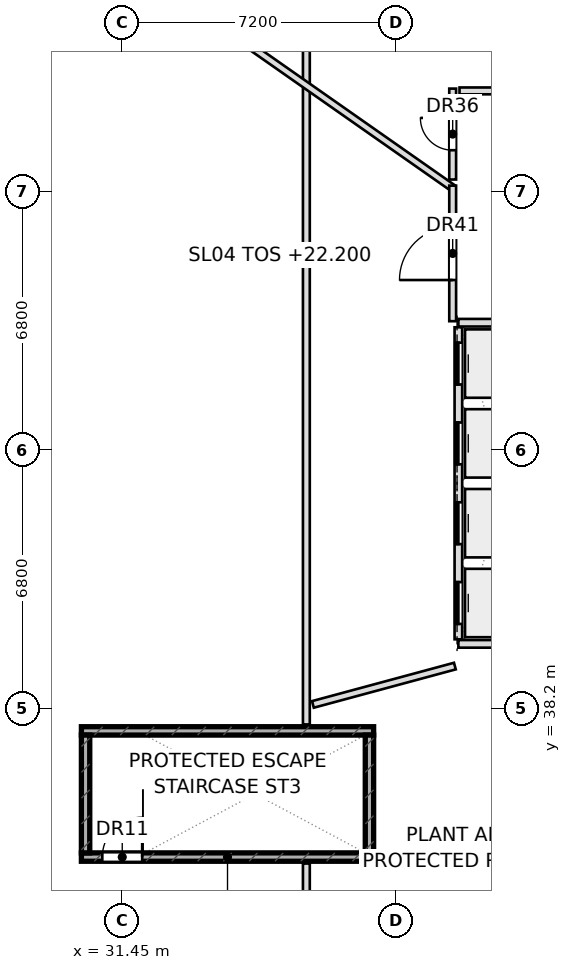
"""IFC4 building model, lengths in metres.
Left out: names, types, materials, properties, quantities, classifications, styles, units other than length and angle.
Written with IfcOpenShell. Run it as: python <this file> out.ifc"""

import sys

from ifc_helpers import new_model, si_unit, direction, frame, frame_2d, origin, place, context, subcontext, project, spatial, rectangle, extrude, element, fill, save


model = new_model("IFC4")
c1 = context("Model", 3, precision=1e-05, world=origin(), true_north=direction((0.0, 1.0)))
c2 = subcontext(c1, "Body", "Model", "MODEL_VIEW")
j1 = project(units=[si_unit("LENGTHUNIT", "METRE"), si_unit("PLANEANGLEUNIT", "RADIAN")], contexts=[c1])
p1 = place(None, origin())
s1 = spatial("IfcSite", under=j1, at=p1, CompositionType="ELEMENT")
p2 = place(p1, origin())
s2 = spatial("IfcBuilding", under=s1, at=p2, CompositionType="ELEMENT")
p3 = place(p2, frame((0.0, 0.0, 22.2)))
s3 = spatial("IfcBuildingStorey", under=s2, at=p3, CompositionType="ELEMENT", Elevation=22.2)
p4 = place(p3, frame((30.38, 34.29, 0.0), z_axis=(0.0, 0.0, 1.0), x_axis=(1.0, 0.0, 0.0)))
e1 = element("IfcWall", 1, at=p4, inside=s3, PredefinedType="SHEAR", context=c2, shape_type="SweptSolid", body=[
    extrude(rectangle(XDim=7.69, YDim=0.22, at=frame_2d((3.845, 0.0))), origin(), (0.0, 0.0, 1.0), 5.1),
])
p5 = place(p4, frame((0.55, 0.0, 0.0)))
e2 = element("IfcOpeningElement", 2, at=p5, cuts=e1, PredefinedType="OPENING", context=c2, shape_type="SweptSolid", body=[
    extrude(rectangle(XDim=1.05, YDim=2.2, at=frame_2d((0.525, 1.1))), frame((0.0, 0.12, 0.0), z_axis=(0.0, -1.0, 0.0), x_axis=(1.0, 0.0, 0.0)), (0.0, 0.0, 1.0), 0.24),
])
p6 = place(p3, frame((30.38, 37.61, 0.0), z_axis=(0.0, 0.0, 1.0), x_axis=(1.0, 0.0, 0.0)))
e3 = element("IfcWall", 3, at=p6, inside=s3, PredefinedType="SHEAR", context=c2, shape_type="SweptSolid", body=[
    extrude(rectangle(XDim=7.69, YDim=0.22, at=frame_2d((3.845, 0.0))), origin(), (0.0, 0.0, 1.0), 5.1),
])
for number, where, z_axis, x_axis in (
    (4, (37.96, 34.4, 0.0), (0.0, 0.0, 1.0), (0.0, 1.0, 0.0)),
    (5, (30.49, 34.4, 0.0), (0.0, 0.0, 1.0), (0.0, 1.0, 0.0)),
):
    element("IfcWall", number, at=place(p3, frame(where, z_axis=z_axis, x_axis=x_axis)), inside=s3, PredefinedType="SHEAR", context=c2, shape_type="SweptSolid", body=[
        extrude(rectangle(XDim=3.1, YDim=0.22, at=frame_2d((1.55, 0.0))), origin(), (0.0, 0.0, 1.0), 5.1),
    ])
for number, where, z_axis, x_axis in (
    (6, (40.3, 39.9, 0.0), (0.0, 0.0, 1.0), (1.0, 0.0, 0.0)),
    (7, (40.3, 48.35, 0.0), (0.0, 0.0, 1.0), (1.0, 0.0, 0.0)),
):
    element("IfcWall", number, at=place(p3, frame(where, z_axis=z_axis, x_axis=x_axis)), inside=s3, PredefinedType="PARTITIONING", context=c2, shape_type="SweptSolid", body=[
        extrude(rectangle(XDim=2.5, YDim=0.2, at=frame_2d((1.25, 0.0))), origin(), (0.0, 0.0, 1.0), 5.1),
    ])
p7 = place(p3, frame((36.3, 27.2, 0.0), z_axis=(0.0, 0.0, 1.0), x_axis=(0.0, 1.0, 0.0)))
e8 = element("IfcWall", 8, at=p7, inside=s3, PredefinedType="PARTITIONING", context=c2, shape_type="SweptSolid", body=[
    extrude(rectangle(XDim=6.92, YDim=0.18, at=frame_2d((3.46, 0.0))), origin(), (0.0, 0.0, 1.0), 2.575),
])
p8 = place(p3, frame((36.3, 37.78, 0.0), z_axis=(0.0, 0.0, 1.0), x_axis=(0.0, 1.0, 0.0)))
e9 = element("IfcWall", 9, at=p8, inside=s3, PredefinedType="PARTITIONING", context=c2, shape_type="SweptSolid", body=[
    extrude(rectangle(XDim=25.02, YDim=0.18, at=frame_2d((12.51, 0.0))), origin(), (0.0, 0.0, 1.0), 2.575),
])
p9 = place(p3, frame((40.15, 51.897, 0.0), z_axis=(0.0, 0.0, 1.0), x_axis=(-0.819143359288, 0.573588839619, 0.0)))
e10 = element("IfcWall", 10, at=p9, inside=s3, PredefinedType="PARTITIONING", context=c2, shape_type="SweptSolid", body=[
    extrude(rectangle(XDim=11.269, YDim=0.18, at=frame_2d((5.634, 0.0))), origin(), (0.0, 0.0, 1.0), 2.575),
])
p10 = place(p3, frame((40.15, 48.39, 0.0), z_axis=(0.0, 0.0, 1.0), x_axis=(0.0, 1.0, 0.0)))
e11 = element("IfcWall", 11, at=p10, inside=s3, PredefinedType="PARTITIONING", context=c2, shape_type="SweptSolid", body=[
    extrude(rectangle(XDim=3.567, YDim=0.18, at=frame_2d((1.784, 0.0))), origin(), (0.0, 0.0, 1.0), 5.1),
])
p11 = place(p10, frame((1.083, 0.0, 0.0)))
e12 = element("IfcOpeningElement", 12, at=p11, cuts=e11, PredefinedType="OPENING", context=c2, shape_type="SweptSolid", body=[
    extrude(rectangle(XDim=1.4, YDim=2.15, at=frame_2d((0.7, 1.075))), frame((0.0, 0.1, 0.0), z_axis=(0.0, -1.0, 0.0), x_axis=(1.0, 0.0, 0.0)), (0.0, 0.0, 1.0), 0.2),
])
p12 = place(p3, frame((40.15, 52.118, 0.0), z_axis=(0.0, 0.0, 1.0), x_axis=(0.0, 1.0, 0.0)))
e13 = element("IfcWall", 13, at=p12, inside=s3, PredefinedType="PARTITIONING", context=c2, shape_type="SweptSolid", body=[
    extrude(rectangle(XDim=2.392, YDim=0.18, at=frame_2d((1.196, 0.0))), origin(), (0.0, 0.0, 1.0), 2.575),
])
p13 = place(p12, frame((0.771, 0.0, 0.0)))
e14 = element("IfcOpeningElement", 14, at=p13, cuts=e13, PredefinedType="OPENING", context=c2, shape_type="SweptSolid", body=[
    extrude(rectangle(XDim=0.85, YDim=2.05, at=frame_2d((0.425, 1.025))), frame((0.0, 0.1, 0.0), z_axis=(0.0, -1.0, 0.0), x_axis=(1.0, 0.0, 0.0)), (0.0, 0.0, 1.0), 0.2),
])
p14 = place(p3, frame((40.33, 54.45, 0.0), z_axis=(0.0, 0.0, 1.0), x_axis=(1.0, 0.0, 0.0)))
e15 = element("IfcWall", 15, at=p14, inside=s3, PredefinedType="PARTITIONING", context=c2, shape_type="SweptSolid", body=[
    extrude(rectangle(XDim=2.63, YDim=0.18, at=frame_2d((1.315, 0.0))), origin(), (0.0, 0.0, 1.0), 5.1),
])
p15 = place(p3, frame((36.472, 38.306, 0.0), z_axis=(0.0, 0.0, 1.0), x_axis=(0.96539001514, 0.260810503371, 0.0)))
e16 = element("IfcWall", 16, at=p15, inside=s3, PredefinedType="PARTITIONING", context=c2, shape_type="SweptSolid", body=[
    extrude(rectangle(XDim=3.87, YDim=0.18, at=frame_2d((1.935, 0.0))), origin(), (0.0, 0.0, 1.0), 5.1),
])
p16 = place(p3, frame((29.812, 56.673, 0.0), z_axis=(0.0, 0.0, 1.0), x_axis=(-0.450629246348, -0.892711197608, 0.0)))
e17 = element("IfcWall", 17, at=p16, inside=s3, PredefinedType="STANDARD", context=c2, shape_type="SweptSolid", body=[
    extrude(rectangle(XDim=8.626, YDim=0.28, at=frame_2d((4.313, 0.0))), origin(), (0.0, 0.0, 1.0), 2.575),
])
p17 = place(p3, frame((40.3, 40.02, 0.0), z_axis=(0.0, 0.0, 1.0), x_axis=(0.0, 1.0, 0.0)))
e18 = element("IfcWall", 18, at=p17, inside=s3, PredefinedType="PARTITIONING", context=c2, shape_type="SweptSolid", body=[
    extrude(rectangle(XDim=8.21, YDim=0.2, at=frame_2d((4.105, 0.0))), origin(), (0.0, 0.0, 1.0), 5.1),
])
p18 = place(p17, frame((0.405, 0.0, 0.0)))
e19 = element("IfcOpeningElement", 19, at=p18, cuts=e18, PredefinedType="OPENING", context=c2, shape_type="SweptSolid", body=[
    extrude(rectangle(XDim=1.1, YDim=2.15, at=frame_2d((0.55, 1.075))), frame((0.0, 0.11, 0.0), z_axis=(0.0, -1.0, 0.0), x_axis=(1.0, 0.0, 0.0)), (0.0, 0.0, 1.0), 0.22),
])
p19 = place(p17, frame((2.505, 0.0, 0.0)))
e20 = element("IfcOpeningElement", 20, at=p19, cuts=e18, PredefinedType="OPENING", context=c2, shape_type="SweptSolid", body=[
    extrude(rectangle(XDim=1.1, YDim=2.15, at=frame_2d((0.55, 1.075))), frame((0.0, 0.11, 0.0), z_axis=(0.0, -1.0, 0.0), x_axis=(1.0, 0.0, 0.0)), (0.0, 0.0, 1.0), 0.22),
])
p20 = place(p17, frame((4.605, 0.0, 0.0)))
e21 = element("IfcOpeningElement", 21, at=p20, cuts=e18, PredefinedType="OPENING", context=c2, shape_type="SweptSolid", body=[
    extrude(rectangle(XDim=1.1, YDim=2.15, at=frame_2d((0.55, 1.075))), frame((0.0, 0.11, 0.0), z_axis=(0.0, -1.0, 0.0), x_axis=(1.0, 0.0, 0.0)), (0.0, 0.0, 1.0), 0.22),
])
p21 = place(p17, frame((6.705, 0.0, 0.0)))
e22 = element("IfcOpeningElement", 22, at=p21, cuts=e18, PredefinedType="OPENING", context=c2, shape_type="SweptSolid", body=[
    extrude(rectangle(XDim=1.1, YDim=2.15, at=frame_2d((0.55, 1.075))), frame((0.0, 0.11, 0.0), z_axis=(0.0, -1.0, 0.0), x_axis=(1.0, 0.0, 0.0)), (0.0, 0.0, 1.0), 0.22),
])
p22 = place(p5, origin())
e23 = element("IfcDoor", 23, at=p22, inside=s3, OperationType="SINGLE_SWING_RIGHT", PredefinedType="DOOR", context=c2, shape_type="SweptSolid", body=[
    extrude(rectangle(XDim=1.05, YDim=2.2, at=frame_2d((0.525, 1.1))), frame((0.0, 0.025, 0.0), z_axis=(0.0, -1.0, 0.0), x_axis=(1.0, 0.0, 0.0)), (0.0, 0.0, 1.0), 0.05),
])
fill(e2, e23)
p23 = place(p11, origin())
e24 = element("IfcDoor", 24, at=p23, inside=s3, OperationType="SINGLE_SWING_LEFT", PredefinedType="DOOR", context=c2, shape_type="SweptSolid", body=[
    extrude(rectangle(XDim=1.4, YDim=2.15, at=frame_2d((0.7, 1.075))), frame((0.0, 0.025, 0.0), z_axis=(0.0, -1.0, 0.0), x_axis=(1.0, 0.0, 0.0)), (0.0, 0.0, 1.0), 0.05),
])
fill(e12, e24)
p24 = place(p13, origin())
e25 = element("IfcDoor", 25, at=p24, inside=s3, OperationType="SINGLE_SWING_RIGHT", PredefinedType="DOOR", context=c2, shape_type="SweptSolid", body=[
    extrude(rectangle(XDim=0.85, YDim=2.05, at=frame_2d((0.425, 1.025))), frame((0.0, 0.025, 0.0), z_axis=(0.0, -1.0, 0.0), x_axis=(1.0, 0.0, 0.0)), (0.0, 0.0, 1.0), 0.05),
])
fill(e14, e25)
p25 = place(p18, origin())
e26 = element("IfcDoor", 26, at=p25, inside=s3, OperationType="SLIDING_TO_LEFT", PredefinedType="DOOR", context=c2, shape_type="SweptSolid", body=[
    extrude(rectangle(XDim=1.1, YDim=2.15, at=frame_2d((0.55, 1.075))), frame((0.0, 0.025, 0.0), z_axis=(0.0, -1.0, 0.0), x_axis=(1.0, 0.0, 0.0)), (0.0, 0.0, 1.0), 0.05),
])
fill(e19, e26)
p26 = place(p19, origin())
e27 = element("IfcDoor", 27, at=p26, inside=s3, OperationType="SLIDING_TO_RIGHT", PredefinedType="DOOR", context=c2, shape_type="SweptSolid", body=[
    extrude(rectangle(XDim=1.1, YDim=2.15, at=frame_2d((0.55, 1.075))), frame((0.0, 0.025, 0.0), z_axis=(0.0, -1.0, 0.0), x_axis=(1.0, 0.0, 0.0)), (0.0, 0.0, 1.0), 0.05),
])
fill(e20, e27)
p27 = place(p20, origin())
e28 = element("IfcDoor", 28, at=p27, inside=s3, OperationType="SLIDING_TO_LEFT", PredefinedType="DOOR", context=c2, shape_type="SweptSolid", body=[
    extrude(rectangle(XDim=1.1, YDim=2.15, at=frame_2d((0.55, 1.075))), frame((0.0, 0.025, 0.0), z_axis=(0.0, -1.0, 0.0), x_axis=(1.0, 0.0, 0.0)), (0.0, 0.0, 1.0), 0.05),
])
fill(e21, e28)
p28 = place(p21, origin())
e29 = element("IfcDoor", 29, at=p28, inside=s3, OperationType="SLIDING_TO_RIGHT", PredefinedType="DOOR", context=c2, shape_type="SweptSolid", body=[
    extrude(rectangle(XDim=1.1, YDim=2.15, at=frame_2d((0.55, 1.075))), frame((0.0, 0.025, 0.0), z_axis=(0.0, -1.0, 0.0), x_axis=(1.0, 0.0, 0.0)), (0.0, 0.0, 1.0), 0.05),
])
fill(e22, e29)
save(model, sys.argv[1])
